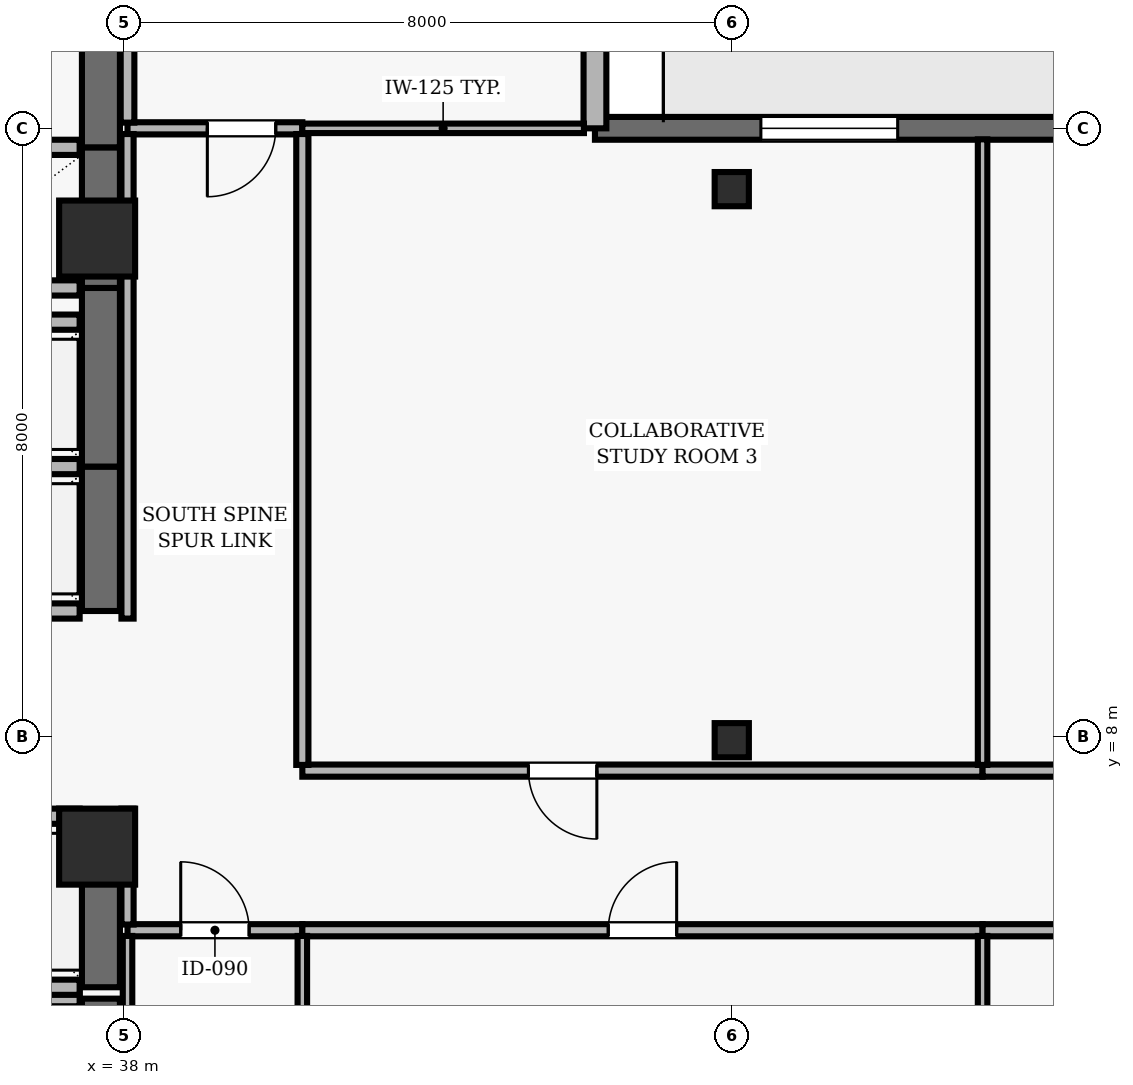
"""IFC4 building model, lengths in metres.
Left out: names, types, materials, properties, quantities, classifications, styles, units other than length and angle.
Written with IfcOpenShell. Run it as: python <this file> out.ifc"""

import sys

from ifc_helpers import new_model, si_unit, direction, frame, frame_2d, origin, origin_2d, place, context, subcontext, project, spatial, rectangle, hollow_rectangle, extrude, element, fill, save


model = new_model("IFC4")
c1 = context("Model", 3, precision=1e-05, world=origin(), true_north=direction((0.0, 1.0)))
c2 = subcontext(c1, "Body", "Model", "MODEL_VIEW")
j1 = project(units=[si_unit("LENGTHUNIT", "METRE"), si_unit("PLANEANGLEUNIT", "RADIAN")], contexts=[c1])
p1 = place(None, origin())
s1 = spatial("IfcSite", under=j1, at=p1, CompositionType="ELEMENT")
p2 = place(p1, origin())
s2 = spatial("IfcBuilding", under=s1, at=p2, CompositionType="ELEMENT")
p3 = place(p2, frame((0.0, 0.0, 218.7)))
s3 = spatial("IfcBuildingStorey", under=s2, at=p3, CompositionType="ELEMENT", Elevation=218.7)
for number, where, z_axis, x_axis in (
    (1, (37.65, 6.55, 0.0), (0.0, 0.0, 1.0), (1.0, 0.0, 0.0)),
    (2, (37.65, 14.55, 0.0), (0.0, 0.0, 1.0), (1.0, 0.0, 0.0)),
):
    element("IfcColumn", number, at=place(p3, frame(where, z_axis=z_axis, x_axis=x_axis)), inside=s3, PredefinedType="COLUMN", context=c2, shape_type="SweptSolid", body=[
        extrude(rectangle(XDim=1.0, YDim=1.0, at=origin_2d()), origin(), (0.0, 0.0, 1.0), 3.9),
    ])
for number, where, z_axis, x_axis in (
    (3, (46.0, 7.95, 0.0), (0.0, 0.0, 1.0), (1.0, 0.0, 0.0)),
    (4, (46.0, 15.2, 0.0), (0.0, 0.0, 1.0), (1.0, 0.0, 0.0)),
):
    element("IfcColumn", number, at=place(p3, frame(where, z_axis=z_axis, x_axis=x_axis)), inside=s3, PredefinedType="COLUMN", context=c2, shape_type="SweptSolid", body=[
        extrude(hollow_rectangle(XDim=0.45, YDim=0.45, WallThickness=0.02, at=origin_2d()), origin(), (0.0, 0.0, 1.0), 3.9),
    ])
p4 = place(p3, frame((62.7, 16.0, 0.0), z_axis=(0.0, 0.0, 1.0), x_axis=(-1.0, 0.0, 0.0)))
e5 = element("IfcWall", 5, at=p4, inside=s3, PredefinedType="SOLIDWALL", context=c2, shape_type="SweptSolid", body=[
    extrude(rectangle(XDim=18.5, YDim=0.3, at=frame_2d((9.25, 0.0))), origin(), (0.0, 0.0, 1.0), 3.69),
])
p5 = place(p4, frame((7.55, 0.0, 0.0)))
e6 = element("IfcOpeningElement", 6, at=p5, cuts=e5, PredefinedType="OPENING", context=c2, shape_type="SweptSolid", body=[
    extrude(rectangle(XDim=1.0, YDim=2.2, at=frame_2d((0.5, 1.1))), frame((0.0, 0.16, 0.0), z_axis=(0.0, -1.0, 0.0), x_axis=(1.0, 0.0, 0.0)), (0.0, 0.0, 1.0), 0.32),
])
p6 = place(p4, frame((2.183, 0.0, 0.9)))
e7 = element("IfcOpeningElement", 7, at=p6, cuts=e5, PredefinedType="OPENING", context=c2, shape_type="SweptSolid", body=[
    extrude(rectangle(XDim=1.8, YDim=2.2, at=frame_2d((0.9, 1.1))), frame((0.0, 0.16, 0.0), z_axis=(0.0, -1.0, 0.0), x_axis=(1.0, 0.0, 0.0)), (0.0, 0.0, 1.0), 0.32),
])
p7 = place(p4, frame((9.25, 0.0, 0.9)))
e8 = element("IfcOpeningElement", 8, at=p7, cuts=e5, PredefinedType="OPENING", context=c2, shape_type="SweptSolid", body=[
    extrude(rectangle(XDim=1.8, YDim=2.2, at=frame_2d((0.9, 1.1))), frame((0.0, 0.16, 0.0), z_axis=(0.0, -1.0, 0.0), x_axis=(1.0, 0.0, 0.0)), (0.0, 0.0, 1.0), 0.32),
])
p8 = place(p4, frame((14.517, 0.0, 0.9)))
e9 = element("IfcOpeningElement", 9, at=p8, cuts=e5, PredefinedType="OPENING", context=c2, shape_type="SweptSolid", body=[
    extrude(rectangle(XDim=1.8, YDim=2.2, at=frame_2d((0.9, 1.1))), frame((0.0, 0.16, 0.0), z_axis=(0.0, -1.0, 0.0), x_axis=(1.0, 0.0, 0.0)), (0.0, 0.0, 1.0), 0.32),
])
p9 = place(p3, frame((44.2, 16.0, 0.0), z_axis=(0.0, 0.0, 1.0), x_axis=(0.0, 1.0, 0.0)))
e10 = element("IfcWall", 10, at=p9, inside=s3, PredefinedType="SOLIDWALL", context=c2, shape_type="SweptSolid", body=[
    extrude(rectangle(XDim=5.0, YDim=0.3, at=frame_2d((2.5, 0.0))), origin(), (0.0, 0.0, 1.0), 3.69),
])
p10 = place(p3, frame((37.7, 2.45, 0.0), z_axis=(0.0, 0.0, 1.0), x_axis=(0.0, 1.0, 0.0)))
e11 = element("IfcWall", 11, at=p10, inside=s3, PredefinedType="SHEAR", context=c2, shape_type="SweptSolid", body=[
    extrude(rectangle(XDim=2.1, YDim=0.5, at=frame_2d((1.05, 0.0))), origin(), (0.0, 0.0, 1.0), 3.69),
])
p11 = place(p3, frame((37.42, 4.55, 0.0), z_axis=(0.0, 0.0, 1.0), x_axis=(-1.0, 0.0, 0.0)))
e12 = element("IfcWall", 12, at=p11, inside=s3, PredefinedType="SOLIDWALL", context=c2, shape_type="SweptSolid", body=[
    extrude(rectangle(XDim=2.14, YDim=0.2, at=frame_2d((1.07, 0.0))), origin(), (0.0, 0.0, 1.0), 3.69),
])
p12 = place(p3, frame((37.7, 4.7, 0.0), z_axis=(0.0, 0.0, 1.0), x_axis=(0.0, 1.0, 0.0)))
e13 = element("IfcWall", 13, at=p12, inside=s3, PredefinedType="SHEAR", context=c2, shape_type="SweptSolid", body=[
    extrude(rectangle(XDim=2.25, YDim=0.5, at=frame_2d((1.125, 0.0))), origin(), (0.0, 0.0, 1.0), 3.69),
])
for number, where, z_axis, x_axis in (
    (14, (35.28, 4.7, 0.0), (0.0, 0.0, 1.0), (1.0, 0.0, 0.0)),
    (15, (37.42, 6.95, 0.0), (0.0, 0.0, 1.0), (-1.0, 0.0, 0.0)),
):
    element("IfcWall", number, at=place(p3, frame(where, z_axis=z_axis, x_axis=x_axis)), inside=s3, PredefinedType="SOLIDWALL", context=c2, shape_type="SweptSolid", body=[
        extrude(rectangle(XDim=2.14, YDim=0.2, at=frame_2d((1.07, 0.0))), origin(), (0.0, 0.0, 1.0), 3.69),
    ])
p13 = place(p3, frame((37.7, 9.65, 0.0), z_axis=(0.0, 0.0, 1.0), x_axis=(0.0, 1.0, 0.0)))
e16 = element("IfcWall", 16, at=p13, inside=s3, PredefinedType="SHEAR", context=c2, shape_type="SweptSolid", body=[
    extrude(rectangle(XDim=1.9, YDim=0.5, at=frame_2d((0.95, 0.0))), origin(), (0.0, 0.0, 1.0), 3.69),
])
for number, where, z_axis, x_axis in (
    (17, (35.28, 9.65, 0.0), (0.0, 0.0, 1.0), (1.0, 0.0, 0.0)),
    (18, (37.42, 11.55, 0.0), (0.0, 0.0, 1.0), (-1.0, 0.0, 0.0)),
):
    element("IfcWall", number, at=place(p3, frame(where, z_axis=z_axis, x_axis=x_axis)), inside=s3, PredefinedType="SOLIDWALL", context=c2, shape_type="SweptSolid", body=[
        extrude(rectangle(XDim=2.14, YDim=0.2, at=frame_2d((1.07, 0.0))), origin(), (0.0, 0.0, 1.0), 3.69),
    ])
p14 = place(p3, frame((37.7, 11.55, 0.0), z_axis=(0.0, 0.0, 1.0), x_axis=(0.0, 1.0, 0.0)))
e19 = element("IfcWall", 19, at=p14, inside=s3, PredefinedType="SHEAR", context=c2, shape_type="SweptSolid", body=[
    extrude(rectangle(XDim=2.35, YDim=0.5, at=frame_2d((1.175, 0.0))), origin(), (0.0, 0.0, 1.0), 3.69),
])
p15 = place(p3, frame((37.42, 13.45, 0.0), z_axis=(0.0, 0.0, 1.0), x_axis=(-1.0, 0.0, 0.0)))
e20 = element("IfcWall", 20, at=p15, inside=s3, PredefinedType="SOLIDWALL", context=c2, shape_type="SweptSolid", body=[
    extrude(rectangle(XDim=2.14, YDim=0.2, at=frame_2d((1.07, 0.0))), origin(), (0.0, 0.0, 1.0), 3.69),
])
p16 = place(p3, frame((37.7, 13.9, 0.0), z_axis=(0.0, 0.0, 1.0), x_axis=(0.0, 1.0, 0.0)))
e21 = element("IfcWall", 21, at=p16, inside=s3, PredefinedType="SHEAR", context=c2, shape_type="SweptSolid", body=[
    extrude(rectangle(XDim=1.85, YDim=0.5, at=frame_2d((0.925, 0.0))), origin(), (0.0, 0.0, 1.0), 3.69),
])
for number, where, z_axis, x_axis in (
    (22, (35.28, 13.9, 0.0), (0.0, 0.0, 1.0), (1.0, 0.0, 0.0)),
    (23, (37.42, 15.75, 0.0), (0.0, 0.0, 1.0), (-1.0, 0.0, 0.0)),
):
    element("IfcWall", number, at=place(p3, frame(where, z_axis=z_axis, x_axis=x_axis)), inside=s3, PredefinedType="SOLIDWALL", context=c2, shape_type="SweptSolid", body=[
        extrude(rectangle(XDim=2.14, YDim=0.2, at=frame_2d((1.07, 0.0))), origin(), (0.0, 0.0, 1.0), 3.69),
    ])
p17 = place(p3, frame((37.7, 15.75, 0.0), z_axis=(0.0, 0.0, 1.0), x_axis=(0.0, 1.0, 0.0)))
e24 = element("IfcWall", 24, at=p17, inside=s3, PredefinedType="SHEAR", context=c2, shape_type="SweptSolid", body=[
    extrude(rectangle(XDim=1.85, YDim=0.5, at=frame_2d((0.925, 0.0))), origin(), (0.0, 0.0, 1.0), 3.69),
])
p18 = place(p3, frame((38.05, 5.45, 0.0), z_axis=(0.0, 0.0, 1.0), x_axis=(1.0, 0.0, 0.0)))
e25 = element("IfcWall", 25, at=p18, inside=s3, PredefinedType="PARTITIONING", context=c2, shape_type="SweptSolid", body=[
    extrude(rectangle(XDim=2.3, YDim=0.16, at=frame_2d((1.15, 0.0))), origin(), (0.0, 0.0, 1.0), 3.372),
])
p19 = place(p18, frame((0.7, 0.0, 0.0)))
e26 = element("IfcOpeningElement", 26, at=p19, cuts=e25, PredefinedType="OPENING", context=c2, shape_type="SweptSolid", body=[
    extrude(rectangle(XDim=0.9, YDim=2.1, at=frame_2d((0.45, 1.05))), frame((0.0, 0.09, 0.0), z_axis=(0.0, -1.0, 0.0), x_axis=(1.0, 0.0, 0.0)), (0.0, 0.0, 1.0), 0.18),
])
p20 = place(p3, frame((40.35, 5.45, 0.0), z_axis=(0.0, 0.0, 1.0), x_axis=(1.0, 0.0, 0.0)))
e27 = element("IfcWall", 27, at=p20, inside=s3, PredefinedType="PARTITIONING", context=c2, shape_type="SweptSolid", body=[
    extrude(rectangle(XDim=8.95, YDim=0.16, at=frame_2d((4.475, 0.0))), origin(), (0.0, 0.0, 1.0), 3.372),
])
p21 = place(p20, frame((4.025, 0.0, 0.0)))
e28 = element("IfcOpeningElement", 28, at=p21, cuts=e27, PredefinedType="OPENING", context=c2, shape_type="SweptSolid", body=[
    extrude(rectangle(XDim=0.9, YDim=2.1, at=frame_2d((0.45, 1.05))), frame((0.0, 0.09, 0.0), z_axis=(0.0, -1.0, 0.0), x_axis=(1.0, 0.0, 0.0)), (0.0, 0.0, 1.0), 0.18),
])
p22 = place(p3, frame((40.35, 16.0, 0.0), z_axis=(0.0, 0.0, 1.0), x_axis=(-1.0, 0.0, 0.0)))
e29 = element("IfcWall", 29, at=p22, inside=s3, PredefinedType="PARTITIONING", context=c2, shape_type="SweptSolid", body=[
    extrude(rectangle(XDim=2.3, YDim=0.16, at=frame_2d((1.15, 0.0))), origin(), (0.0, 0.0, 1.0), 3.39),
])
p23 = place(p22, frame((0.35, 0.0, 0.0)))
e30 = element("IfcOpeningElement", 30, at=p23, cuts=e29, PredefinedType="OPENING", context=c2, shape_type="SweptSolid", body=[
    extrude(rectangle(XDim=0.9, YDim=2.1, at=frame_2d((0.45, 1.05))), frame((0.0, 0.09, 0.0), z_axis=(0.0, -1.0, 0.0), x_axis=(1.0, 0.0, 0.0)), (0.0, 0.0, 1.0), 0.18),
])
p24 = place(p3, frame((40.35, 16.0, 0.0), z_axis=(0.0, 0.0, 1.0), x_axis=(1.0, 0.0, 0.0)))
e31 = element("IfcWall", 31, at=p24, inside=s3, PredefinedType="PARTITIONING", context=c2, shape_type="SweptSolid", body=[
    extrude(rectangle(XDim=3.705, YDim=0.125, at=frame_2d((1.853, 0.0))), origin(), (0.0, 0.0, 1.0), 3.39),
])
p25 = place(p3, frame((49.3, 5.45, 0.0), z_axis=(0.0, 0.0, 1.0), x_axis=(1.0, 0.0, 0.0)))
e32 = element("IfcWall", 32, at=p25, inside=s3, PredefinedType="PARTITIONING", context=c2, shape_type="SweptSolid", body=[
    extrude(rectangle(XDim=8.5, YDim=0.16, at=frame_2d((4.25, 0.0))), origin(), (0.0, 0.0, 1.0), 3.372),
])
p26 = place(p25, frame((3.8, 0.0, 0.0)))
e33 = element("IfcOpeningElement", 33, at=p26, cuts=e32, PredefinedType="OPENING", context=c2, shape_type="SweptSolid", body=[
    extrude(rectangle(XDim=0.9, YDim=2.1, at=frame_2d((0.45, 1.05))), frame((0.0, 0.09, 0.0), z_axis=(0.0, -1.0, 0.0), x_axis=(1.0, 0.0, 0.0)), (0.0, 0.0, 1.0), 0.18),
])
p27 = place(p3, frame((49.3, 7.55, 0.0), z_axis=(0.0, 0.0, 1.0), x_axis=(-1.0, 0.0, 0.0)))
e34 = element("IfcWall", 34, at=p27, inside=s3, PredefinedType="PARTITIONING", context=c2, shape_type="SweptSolid", body=[
    extrude(rectangle(XDim=8.95, YDim=0.16, at=frame_2d((4.475, 0.0))), origin(), (0.0, 0.0, 1.0), 3.146),
])
p28 = place(p27, frame((5.075, 0.0, 0.0)))
e35 = element("IfcOpeningElement", 35, at=p28, cuts=e34, PredefinedType="OPENING", context=c2, shape_type="SweptSolid", body=[
    extrude(rectangle(XDim=0.9, YDim=2.1, at=frame_2d((0.45, 1.05))), frame((0.0, 0.09, 0.0), z_axis=(0.0, -1.0, 0.0), x_axis=(1.0, 0.0, 0.0)), (0.0, 0.0, 1.0), 0.18),
])
p29 = place(p3, frame((57.8, 7.55, 0.0), z_axis=(0.0, 0.0, 1.0), x_axis=(-1.0, 0.0, 0.0)))
e36 = element("IfcWall", 36, at=p29, inside=s3, PredefinedType="PARTITIONING", context=c2, shape_type="SweptSolid", body=[
    extrude(rectangle(XDim=8.5, YDim=0.16, at=frame_2d((4.25, 0.0))), origin(), (0.0, 0.0, 1.0), 3.146),
])
p30 = place(p29, frame((3.45, 0.0, 0.0)))
e37 = element("IfcOpeningElement", 37, at=p30, cuts=e36, PredefinedType="OPENING", context=c2, shape_type="SweptSolid", body=[
    extrude(rectangle(XDim=0.9, YDim=2.1, at=frame_2d((0.45, 1.05))), frame((0.0, 0.09, 0.0), z_axis=(0.0, -1.0, 0.0), x_axis=(1.0, 0.0, 0.0)), (0.0, 0.0, 1.0), 0.18),
])
p31 = place(p3, frame((38.05, 5.375, 0.0), z_axis=(0.0, 0.0, 1.0), x_axis=(0.0, -1.0, 0.0)))
e38 = element("IfcWall", 38, at=p31, inside=s3, PredefinedType="PARTITIONING", context=c2, shape_type="SweptSolid", body=[
    extrude(rectangle(XDim=5.23, YDim=0.125, at=frame_2d((2.615, 0.0))), origin(), (0.0, 0.0, 1.0), 3.146),
])
p32 = place(p3, frame((38.05, 7.05, 0.0), z_axis=(0.0, 0.0, 1.0), x_axis=(0.0, -1.0, 0.0)))
e39 = element("IfcWall", 39, at=p32, inside=s3, PredefinedType="PARTITIONING", context=c2, shape_type="SweptSolid", body=[
    extrude(rectangle(XDim=1.525, YDim=0.16, at=frame_2d((0.763, 0.0))), origin(), (0.0, 0.0, 1.0), 3.146),
])
p33 = place(p3, frame((38.05, 15.925, 0.0), z_axis=(0.0, 0.0, 1.0), x_axis=(0.0, -1.0, 0.0)))
e40 = element("IfcWall", 40, at=p33, inside=s3, PredefinedType="PARTITIONING", context=c2, shape_type="SweptSolid", body=[
    extrude(rectangle(XDim=6.375, YDim=0.16, at=frame_2d((3.188, 0.0))), origin(), (0.0, 0.0, 1.0), 3.146),
])
p34 = place(p3, frame((38.05, 22.055, 0.0), z_axis=(0.0, 0.0, 1.0), x_axis=(0.0, -1.0, 0.0)))
e41 = element("IfcWall", 41, at=p34, inside=s3, PredefinedType="PARTITIONING", context=c2, shape_type="SweptSolid", body=[
    extrude(rectangle(XDim=5.98, YDim=0.18, at=frame_2d((2.99, 0.0))), origin(), (0.0, 0.0, 1.0), 3.146),
])
p35 = place(p3, frame((40.35, 0.145, 0.0), z_axis=(0.0, 0.0, 1.0), x_axis=(0.0, 1.0, 0.0)))
e42 = element("IfcWall", 42, at=p35, inside=s3, PredefinedType="PARTITIONING", context=c2, shape_type="SweptSolid", body=[
    extrude(rectangle(XDim=5.23, YDim=0.125, at=frame_2d((2.615, 0.0))), origin(), (0.0, 0.0, 1.0), 3.69),
])
p36 = place(p3, frame((40.35, 7.625, 0.0), z_axis=(0.0, 0.0, 1.0), x_axis=(0.0, 1.0, 0.0)))
e43 = element("IfcWall", 43, at=p36, inside=s3, PredefinedType="PARTITIONING", context=c2, shape_type="SweptSolid", body=[
    extrude(rectangle(XDim=8.3, YDim=0.16, at=frame_2d((4.15, 0.0))), origin(), (0.0, 0.0, 1.0), 3.69),
])
p37 = place(p3, frame((49.3, 0.145, 0.0), z_axis=(0.0, 0.0, 1.0), x_axis=(0.0, 1.0, 0.0)))
e44 = element("IfcWall", 44, at=p37, inside=s3, PredefinedType="PARTITIONING", context=c2, shape_type="SweptSolid", body=[
    extrude(rectangle(XDim=5.23, YDim=0.125, at=frame_2d((2.615, 0.0))), origin(), (0.0, 0.0, 1.0), 3.69),
])
p38 = place(p3, frame((49.3, 7.625, 0.0), z_axis=(0.0, 0.0, 1.0), x_axis=(0.0, 1.0, 0.0)))
e45 = element("IfcWall", 45, at=p38, inside=s3, PredefinedType="PARTITIONING", context=c2, shape_type="SweptSolid", body=[
    extrude(rectangle(XDim=8.23, YDim=0.125, at=frame_2d((4.115, 0.0))), origin(), (0.0, 0.0, 1.0), 3.69),
])
p39 = place(p8, origin())
e46 = element("IfcWindow", 46, at=p39, inside=s3, PartitioningType="SINGLE_PANEL", PredefinedType="WINDOW", context=c2, shape_type="SweptSolid", body=[
    extrude(rectangle(XDim=1.8, YDim=2.2, at=frame_2d((0.9, 1.1))), frame((0.0, 0.03, 0.0), z_axis=(0.0, -1.0, 0.0), x_axis=(1.0, 0.0, 0.0)), (0.0, 0.0, 1.0), 0.06),
])
fill(e9, e46)
p40 = place(p19, origin())
e47 = element("IfcDoor", 47, at=p40, inside=s3, OperationType="SINGLE_SWING_LEFT", PredefinedType="DOOR", context=c2, shape_type="SweptSolid", body=[
    extrude(rectangle(XDim=0.9, YDim=2.1, at=frame_2d((0.45, 1.05))), frame((0.0, 0.025, 0.0), z_axis=(0.0, -1.0, 0.0), x_axis=(1.0, 0.0, 0.0)), (0.0, 0.0, 1.0), 0.05),
])
fill(e26, e47)
p41 = place(p21, origin())
e48 = element("IfcDoor", 48, at=p41, inside=s3, OperationType="SINGLE_SWING_RIGHT", PredefinedType="DOOR", context=c2, shape_type="SweptSolid", body=[
    extrude(rectangle(XDim=0.9, YDim=2.1, at=frame_2d((0.45, 1.05))), frame((0.0, 0.025, 0.0), z_axis=(0.0, -1.0, 0.0), x_axis=(1.0, 0.0, 0.0)), (0.0, 0.0, 1.0), 0.05),
])
fill(e28, e48)
p42 = place(p28, origin())
e49 = element("IfcDoor", 49, at=p42, inside=s3, OperationType="SINGLE_SWING_LEFT", PredefinedType="DOOR", context=c2, shape_type="SweptSolid", body=[
    extrude(rectangle(XDim=0.9, YDim=2.1, at=frame_2d((0.45, 1.05))), frame((0.0, 0.025, 0.0), z_axis=(0.0, -1.0, 0.0), x_axis=(1.0, 0.0, 0.0)), (0.0, 0.0, 1.0), 0.05),
])
fill(e35, e49)
p43 = place(p23, origin())
e50 = element("IfcDoor", 50, at=p43, inside=s3, OperationType="SINGLE_SWING_RIGHT", PredefinedType="DOOR", context=c2, shape_type="SweptSolid", body=[
    extrude(rectangle(XDim=0.9, YDim=2.1, at=frame_2d((0.45, 1.05))), frame((0.0, 0.025, 0.0), z_axis=(0.0, -1.0, 0.0), x_axis=(1.0, 0.0, 0.0)), (0.0, 0.0, 1.0), 0.05),
])
fill(e30, e50)
save(model, sys.argv[1])
